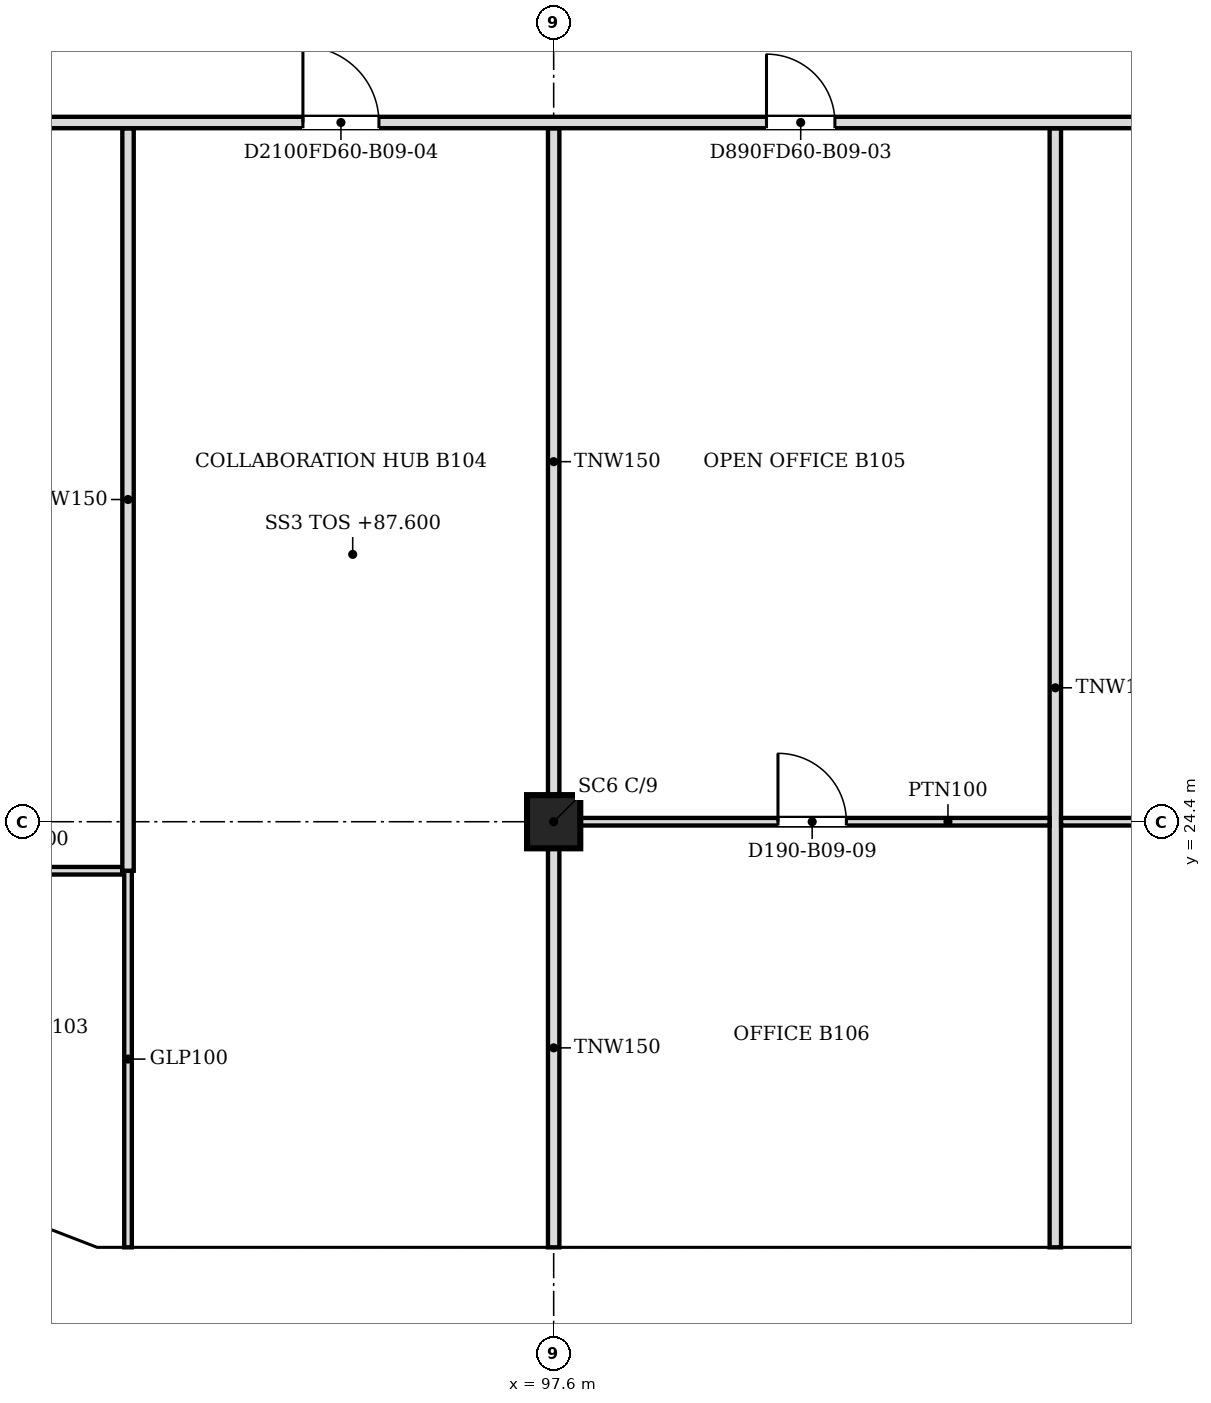
"""IFC4 building model, lengths in metres.
Left out: names, types, materials, properties, quantities, classifications, styles, units other than length and angle.
Written with IfcOpenShell. Run it as: python <this file> out.ifc"""

import sys

from ifc_helpers import new_model, si_unit, direction, frame, frame_2d, origin, origin_2d, place, context, subcontext, project, spatial, polyline, rectangle, outline, extrude, faceted_brep, source, transform, mapped, element, fill, save


model = new_model("IFC4")
c1 = context("Model", 3, precision=1e-05, world=origin(), true_north=direction((0.0, 1.0)))
c2 = subcontext(c1, "Body", "Model", "MODEL_VIEW")
j1 = project(units=[si_unit("LENGTHUNIT", "METRE"), si_unit("PLANEANGLEUNIT", "RADIAN")], contexts=[c1])
p1 = place(None, origin())
s1 = spatial("IfcSite", under=j1, at=p1, CompositionType="ELEMENT")
p2 = place(p1, origin())
s2 = spatial("IfcBuilding", under=s1, at=p2, CompositionType="ELEMENT")
p3 = place(p2, frame((0.0, 0.0, 87.6)))
s3 = spatial("IfcBuildingStorey", under=s2, at=p3, CompositionType="ELEMENT", Elevation=87.6)
p4 = place(p3, frame((97.6, 24.4, 0.0), z_axis=(0.0, 0.0, 1.0), x_axis=(1.0, 0.0, 0.0)))
e1 = element("IfcColumn", 1, at=p4, inside=s3, PredefinedType="COLUMN", context=c2, shape_type="SweptSolid", body=[
    extrude(rectangle(XDim=0.7, YDim=0.7, at=origin_2d()), origin(), (0.0, 0.0, 1.0), 3.6),
])
m1 = source(origin(), c2, "Body", "Brep", [
    faceted_brep([(3.003, -0.25, 0.0), (6.053, -0.25, 3.8), (3.003, -0.25, 7.6), (0.0, -0.25, 3.8), (0.047, 0.25, 3.859), (3.003, 0.25, 7.6), (6.053, 0.25, 3.8), (3.003, 0.25, 0.0), (0.047, 0.25, 3.741), (0.0, 0.0, 3.8)], [[[0, 1, 2, 3]], [[4, 5, 6, 7, 8]], [[7, 6, 1, 0]], [[6, 5, 2, 1]], [[5, 4, 9, 3, 2]], [[8, 7, 0, 3, 9]], [[8, 9, 4]]]),
])
p5 = place(p3, frame((91.547, 18.55, -3.8), z_axis=(0.0, 0.0, 1.0), x_axis=(1.0, 0.0, 0.0)))
e2 = element("IfcWall", 2, at=p5, inside=s3, PredefinedType="SOLIDWALL", context=c2, shape_type="MappedRepresentation", body=[
    mapped(m1, transform((0.0, 0.0, 0.0), scale=1.0)),
])
m2 = source(origin(), c2, "Body", "SweptSolid", [
    extrude(outline(polyline([(3.005, 0.401), (5.733, 3.8), (3.005, 7.199), (0.319, 3.8), (3.005, 0.401)])), frame((0.0, 0.26, 0.0), z_axis=(0.0, -1.0, 0.0), x_axis=(1.0, 0.0, 0.0)), (0.0, 0.0, 1.0), 0.52),
])
p6 = place(p5, origin())
e3 = element("IfcOpeningElement", 3, at=p6, cuts=e2, PredefinedType="OPENING", context=c2, shape_type="MappedRepresentation", body=[
    mapped(m2, transform((0.0, 0.0, 0.0), scale=1.0)),
])
m3 = source(origin(), c2, "Body", "Brep", [
    faceted_brep([(3.05, -0.25, 0.0), (6.1, -0.25, 3.8), (6.1, -0.25, 3.8), (3.05, -0.25, 7.6), (0.0, -0.25, 3.8), (0.0, 0.25, 3.8), (3.05, 0.25, 7.6), (6.1, 0.25, 3.8), (6.1, 0.25, 3.8), (3.05, 0.25, 0.0)], [[[0, 1, 2, 3, 4]], [[5, 6, 7, 8, 9]], [[9, 8, 1, 0]], [[7, 6, 3, 2]], [[6, 5, 4, 3]], [[5, 9, 0, 4]], [[1, 8, 7, 2]]]),
])
p7 = place(p3, frame((97.6, 18.55, -3.8), z_axis=(0.0, 0.0, 1.0), x_axis=(1.0, 0.0, 0.0)))
e4 = element("IfcWall", 4, at=p7, inside=s3, PredefinedType="SOLIDWALL", context=c2, shape_type="MappedRepresentation", body=[
    mapped(m3, transform((0.0, 0.0, 0.0), scale=1.0)),
])
m4 = source(origin(), c2, "Body", "SweptSolid", [
    extrude(outline(polyline([(3.05, 0.399), (5.78, 3.8), (3.05, 7.2), (0.321, 3.8), (3.05, 0.399)])), frame((0.0, 0.26, 0.0), z_axis=(0.0, -1.0, 0.0), x_axis=(1.0, 0.0, 0.0)), (0.0, 0.0, 1.0), 0.52),
])
p8 = place(p7, origin())
e5 = element("IfcOpeningElement", 5, at=p8, cuts=e4, PredefinedType="OPENING", context=c2, shape_type="MappedRepresentation", body=[
    mapped(m4, transform((0.0, 0.0, 0.0), scale=1.0)),
])
m5 = source(origin(), c2, "Body", "SweptSolid", [
    extrude(outline(polyline([(3.05, 0.0), (6.1, 3.8), (3.05, 7.6), (0.0, 3.8), (3.05, 0.0)])), frame((0.0, 0.25, 0.0), z_axis=(0.0, -1.0, 0.0), x_axis=(1.0, 0.0, 0.0)), (0.0, 0.0, 1.0), 0.5),
])
p9 = place(p3, frame((103.7, 18.55, -3.8), z_axis=(0.0, 0.0, 1.0), x_axis=(1.0, 0.0, 0.0)))
e6 = element("IfcWall", 6, at=p9, inside=s3, PredefinedType="SOLIDWALL", context=c2, shape_type="MappedRepresentation", body=[
    mapped(m5, transform((0.0, 0.0, 0.0), scale=1.0)),
])
p10 = place(p9, origin())
e7 = element("IfcOpeningElement", 7, at=p10, cuts=e6, PredefinedType="OPENING", context=c2, shape_type="MappedRepresentation", body=[
    mapped(m4, transform((0.0, 0.0, 0.0), scale=1.0)),
])
m6 = source(origin(), c2, "Body", "Brep", [
    faceted_brep([(0.053, -0.25, 0.0), (3.003, -0.25, 3.8), (0.053, -0.25, 7.6), (0.0, -0.25, 7.531), (0.0, -0.25, 0.068), (0.106, 0.25, 7.532), (2.957, 0.25, 3.86), (2.957, 0.25, 3.74), (0.106, 0.25, 0.068), (3.003, 0.0, 3.8), (0.053, 0.0, 0.0), (0.053, 0.0, 7.6)], [[[0, 1, 2, 3, 4]], [[5, 6, 7, 8]], [[8, 7, 9, 1, 0, 10]], [[6, 5, 11, 2, 1, 9]], [[3, 2, 11]], [[10, 0, 4]], [[8, 10, 4, 3, 11, 5]], [[7, 6, 9]]]),
])
p11 = place(p3, frame((88.744, 19.631, -3.8), z_axis=(0.0, 0.0, 1.0), x_axis=(0.932997369089, -0.359883188373, 0.0)))
e8 = element("IfcWall", 8, at=p11, inside=s3, PredefinedType="SOLIDWALL", context=c2, shape_type="MappedRepresentation", body=[
    mapped(m6, transform((0.0, 0.0, 0.0), scale=1.0)),
])
m7 = source(origin(), c2, "Body", "SweptSolid", [
    extrude(outline(polyline([(0.253, 0.665), (2.687, 3.8), (0.253, 6.935), (0.253, 0.665)])), frame((0.0, 0.26, 0.0), z_axis=(0.0, -1.0, 0.0), x_axis=(1.0, 0.0, 0.0)), (0.0, 0.0, 1.0), 0.52),
])
p12 = place(p11, origin())
e9 = element("IfcOpeningElement", 9, at=p12, cuts=e8, PredefinedType="OPENING", context=c2, shape_type="MappedRepresentation", body=[
    mapped(m7, transform((0.0, 0.0, 0.0), scale=1.0)),
])
p13 = place(p2, frame((0.0, 0.0, 91.4)))
s4 = spatial("IfcBuildingStorey", under=s2, at=p13, CompositionType="ELEMENT", Elevation=91.4)
m8 = source(origin(), c2, "Body", "Brep", [
    faceted_brep([(0.047, -0.25, 0.0), (3.05, -0.25, 3.8), (0.047, -0.25, 7.6), (0.0, -0.25, 7.54), (0.0, -0.25, 0.06), (0.093, 0.25, 7.541), (3.05, 0.25, 3.8), (0.093, 0.25, 0.059), (0.047, 0.0, 0.0), (0.047, 0.0, 7.6)], [[[0, 1, 2, 3, 4]], [[5, 6, 7]], [[7, 6, 1, 0, 8]], [[6, 5, 9, 2, 1]], [[3, 2, 9]], [[8, 0, 4]], [[7, 8, 4, 3, 9, 5]]]),
])
p14 = place(p13, frame((91.5, 18.55, -3.8), z_axis=(0.0, 0.0, 1.0), x_axis=(1.0, 0.0, 0.0)))
e10 = element("IfcWall", 10, at=p14, inside=s4, PredefinedType="SOLIDWALL", context=c2, shape_type="MappedRepresentation", body=[
    mapped(m8, transform((0.0, 0.0, 0.0), scale=1.0)),
])
m9 = source(origin(), c2, "Body", "SweptSolid", [
    extrude(outline(polyline([(0.247, 0.656), (2.731, 3.8), (0.247, 6.944), (0.247, 0.656)])), frame((0.0, 0.26, 0.0), z_axis=(0.0, -1.0, 0.0), x_axis=(1.0, 0.0, 0.0)), (0.0, 0.0, 1.0), 0.52),
])
p15 = place(p14, origin())
e11 = element("IfcOpeningElement", 11, at=p15, cuts=e10, PredefinedType="OPENING", context=c2, shape_type="MappedRepresentation", body=[
    mapped(m9, transform((0.0, 0.0, 0.0), scale=1.0)),
])
m10 = source(origin(), c2, "Body", "Brep", [
    faceted_brep([(2.95, -0.25, 0.0), (2.997, -0.25, 0.059), (2.997, -0.25, 7.541), (2.95, -0.25, 7.6), (0.0, -0.25, 3.8), (0.053, 0.25, 3.868), (2.904, 0.25, 7.54), (2.904, 0.25, 0.06), (0.053, 0.25, 3.732), (2.95, 0.0, 0.0), (2.95, 0.0, 7.6), (0.0, 0.0, 3.8)], [[[0, 1, 2, 3, 4]], [[5, 6, 7, 8]], [[1, 0, 9]], [[10, 3, 2]], [[6, 5, 11, 4, 3, 10]], [[8, 7, 9, 0, 4, 11]], [[8, 11, 5]], [[1, 9, 7, 6, 10, 2]]]),
])
p16 = place(p13, frame((88.794, 19.612, -3.8), z_axis=(0.0, 0.0, 1.0), x_axis=(0.933000876937, -0.359874094142, 0.0)))
e12 = element("IfcWall", 12, at=p16, inside=s4, PredefinedType="SOLIDWALL", context=c2, shape_type="MappedRepresentation", body=[
    mapped(m10, transform((0.0, 0.0, 0.0), scale=1.0)),
])
m11 = source(origin(), c2, "Body", "SweptSolid", [
    extrude(outline(polyline([(2.75, 6.935), (0.316, 3.8), (2.75, 0.665), (2.75, 6.935)])), frame((0.0, 0.26, 0.0), z_axis=(0.0, -1.0, 0.0), x_axis=(1.0, 0.0, 0.0)), (0.0, 0.0, 1.0), 0.52),
])
p17 = place(p16, origin())
e13 = element("IfcOpeningElement", 13, at=p17, cuts=e12, PredefinedType="OPENING", context=c2, shape_type="MappedRepresentation", body=[
    mapped(m11, transform((0.0, 0.0, 0.0), scale=1.0)),
])
m12 = source(origin(), c2, "Body", "Brep", [
    faceted_brep([(3.05, -0.25, 0.0), (6.1, -0.25, 3.8), (6.1, -0.25, 3.8), (3.05, -0.25, 7.6), (0.0, -0.25, 3.8), (0.0, 0.25, 3.8), (3.05, 0.25, 7.6), (6.1, 0.25, 3.8), (6.1, 0.25, 3.8), (3.05, 0.25, 0.0)], [[[0, 1, 2, 3, 4]], [[5, 6, 7, 8, 9]], [[9, 8, 1, 0]], [[7, 6, 3, 2]], [[6, 5, 4, 3]], [[5, 9, 0, 4]], [[1, 8, 7, 2]]]),
])
p18 = place(p13, frame((94.55, 18.55, -3.8), z_axis=(0.0, 0.0, 1.0), x_axis=(1.0, 0.0, 0.0)))
e14 = element("IfcWall", 14, at=p18, inside=s4, PredefinedType="SOLIDWALL", context=c2, shape_type="MappedRepresentation", body=[
    mapped(m12, transform((0.0, 0.0, 0.0), scale=1.0)),
])
m13 = source(origin(), c2, "Body", "SweptSolid", [
    extrude(outline(polyline([(3.05, 0.399), (5.78, 3.8), (3.05, 7.2), (0.321, 3.8), (3.05, 0.399)])), frame((0.0, 0.26, 0.0), z_axis=(0.0, -1.0, 0.0), x_axis=(1.0, 0.0, 0.0)), (0.0, 0.0, 1.0), 0.52),
])
p19 = place(p18, origin())
e15 = element("IfcOpeningElement", 15, at=p19, cuts=e14, PredefinedType="OPENING", context=c2, shape_type="MappedRepresentation", body=[
    mapped(m13, transform((0.0, 0.0, 0.0), scale=1.0)),
])
m14 = source(origin(), c2, "Body", "SweptSolid", [
    extrude(outline(polyline([(3.05, 0.0), (6.1, 3.8), (3.05, 7.6), (0.0, 3.8), (3.05, 0.0)])), frame((0.0, 0.25, 0.0), z_axis=(0.0, -1.0, 0.0), x_axis=(1.0, 0.0, 0.0)), (0.0, 0.0, 1.0), 0.5),
])
p20 = place(p13, frame((100.65, 18.55, -3.8), z_axis=(0.0, 0.0, 1.0), x_axis=(1.0, 0.0, 0.0)))
e16 = element("IfcWall", 16, at=p20, inside=s4, PredefinedType="SOLIDWALL", context=c2, shape_type="MappedRepresentation", body=[
    mapped(m14, transform((0.0, 0.0, 0.0), scale=1.0)),
])
p21 = place(p20, origin())
e17 = element("IfcOpeningElement", 17, at=p21, cuts=e16, PredefinedType="OPENING", context=c2, shape_type="MappedRepresentation", body=[
    mapped(m13, transform((0.0, 0.0, 0.0), scale=1.0)),
])
p22 = place(p3, frame((92.0, 18.8, 0.0), z_axis=(0.0, 0.0, 1.0), x_axis=(0.0, 1.0, 0.0)))
e18 = element("IfcWall", 18, at=p22, inside=s3, PredefinedType="PARTITIONING", context=c2, shape_type="SweptSolid", body=[
    extrude(rectangle(XDim=4.954, YDim=0.1, at=frame_2d((2.477, 0.0))), origin(), (0.0, 0.0, 1.0), 3.067),
])
p23 = place(p3, frame((97.6, 18.8, 0.0), z_axis=(0.0, 0.0, 1.0), x_axis=(0.0, 1.0, 0.0)))
e19 = element("IfcWall", 19, at=p23, inside=s3, PredefinedType="PARTITIONING", context=c2, shape_type="SweptSolid", body=[
    extrude(rectangle(XDim=5.249, YDim=0.15, at=frame_2d((2.625, 0.0))), origin(), (0.0, 0.0, 1.0), 3.067),
])
p24 = place(p3, frame((104.2, 18.8, 0.0), z_axis=(0.0, 0.0, 1.0), x_axis=(0.0, 1.0, 0.0)))
e20 = element("IfcWall", 20, at=p24, inside=s3, PredefinedType="PARTITIONING", context=c2, shape_type="SweptSolid", body=[
    extrude(rectangle(XDim=14.724, YDim=0.15, at=frame_2d((7.362, 0.0))), origin(), (0.0, 0.0, 1.0), 3.067),
])
p25 = place(p3, frame((91.924, 23.755, 0.0), z_axis=(0.0, 0.0, 1.0), x_axis=(-1.0, 0.0, 0.0)))
e21 = element("IfcWall", 21, at=p25, inside=s3, PredefinedType="PARTITIONING", context=c2, shape_type="SweptSolid", body=[
    extrude(rectangle(XDim=5.739, YDim=0.1, at=frame_2d((2.87, 0.0))), origin(), (0.0, 0.0, 1.0), 3.067),
])
m15 = source(origin(), c2, "Body", "SweptSolid", [
    extrude(rectangle(XDim=0.9, YDim=2.1, at=frame_2d((0.45, 1.05))), frame((0.0, 0.06, 0.0), z_axis=(0.0, -1.0, 0.0), x_axis=(1.0, 0.0, 0.0)), (0.0, 0.0, 1.0), 0.12),
])
p26 = place(p25, frame((2.439, 0.0, 0.0)))
e22 = element("IfcOpeningElement", 22, at=p26, cuts=e21, PredefinedType="OPENING", context=c2, shape_type="MappedRepresentation", body=[
    mapped(m15, transform((0.0, 0.0, 0.0), scale=1.0)),
])
p27 = place(p3, frame((92.0, 23.755, 0.0), z_axis=(0.0, 0.0, 1.0), x_axis=(0.0, 1.0, 0.0)))
e23 = element("IfcWall", 23, at=p27, inside=s3, PredefinedType="PARTITIONING", context=c2, shape_type="SweptSolid", body=[
    extrude(rectangle(XDim=9.769, YDim=0.15, at=frame_2d((4.885, 0.0))), origin(), (0.0, 0.0, 1.0), 3.067),
])
p28 = place(p3, frame((104.124, 24.4, 0.0), z_axis=(0.0, 0.0, 1.0), x_axis=(-1.0, 0.0, 0.0)))
e24 = element("IfcWall", 24, at=p28, inside=s3, PredefinedType="PARTITIONING", context=c2, shape_type="SweptSolid", body=[
    extrude(rectangle(XDim=6.173, YDim=0.1, at=frame_2d((3.086, 0.0))), origin(), (0.0, 0.0, 1.0), 3.067),
])
p29 = place(p28, frame((2.673, 0.0, 0.0)))
e25 = element("IfcOpeningElement", 25, at=p29, cuts=e24, PredefinedType="OPENING", context=c2, shape_type="MappedRepresentation", body=[
    mapped(m15, transform((0.0, 0.0, 0.0), scale=1.0)),
])
p30 = place(p3, frame((109.449, 24.4, 0.0), z_axis=(0.0, 0.0, 1.0), x_axis=(-1.0, 0.0, 0.0)))
e26 = element("IfcWall", 26, at=p30, inside=s3, PredefinedType="PARTITIONING", context=c2, shape_type="SweptSolid", body=[
    extrude(rectangle(XDim=5.173, YDim=0.1, at=frame_2d((2.586, 0.0))), origin(), (0.0, 0.0, 1.0), 3.067),
])
p31 = place(p30, frame((2.173, 0.0, 0.0)))
e27 = element("IfcOpeningElement", 27, at=p31, cuts=e26, PredefinedType="OPENING", context=c2, shape_type="MappedRepresentation", body=[
    mapped(m15, transform((0.0, 0.0, 0.0), scale=1.0)),
])
p32 = place(p3, frame((97.6, 24.751, 0.0), z_axis=(0.0, 0.0, 1.0), x_axis=(0.0, 1.0, 0.0)))
e28 = element("IfcWall", 28, at=p32, inside=s3, PredefinedType="PARTITIONING", context=c2, shape_type="SweptSolid", body=[
    extrude(rectangle(XDim=8.773, YDim=0.15, at=frame_2d((4.386, 0.0))), origin(), (0.0, 0.0, 1.0), 3.067),
])
p33 = place(p3, frame((133.7, 33.6, 0.0), z_axis=(0.0, 0.0, 1.0), x_axis=(-1.0, 0.0, 0.0)))
e29 = element("IfcWall", 29, at=p33, inside=s3, PredefinedType="PARTITIONING", context=c2, shape_type="SweptSolid", body=[
    extrude(rectangle(XDim=47.8, YDim=0.15, at=frame_2d((23.9, 0.0))), origin(), (0.0, 0.0, 1.0), 3.067),
])
m16 = source(origin(), c2, "Body", "SweptSolid", [
    extrude(rectangle(XDim=0.9, YDim=2.1, at=frame_2d((0.45, 1.05))), frame((0.0, 0.085, 0.0), z_axis=(0.0, -1.0, 0.0), x_axis=(1.0, 0.0, 0.0)), (0.0, 0.0, 1.0), 0.17),
])
p34 = place(p33, frame((2.099, 0.0, 0.0)))
e30 = element("IfcOpeningElement", 30, at=p34, cuts=e29, PredefinedType="OPENING", context=c2, shape_type="MappedRepresentation", body=[
    mapped(m16, transform((0.0, 0.0, 0.0), scale=1.0)),
])
m17 = source(origin(), c2, "Body", "SweptSolid", [
    extrude(rectangle(XDim=1.0, YDim=2.1, at=frame_2d((0.5, 1.05))), frame((0.0, 0.085, 0.0), z_axis=(0.0, -1.0, 0.0), x_axis=(1.0, 0.0, 0.0)), (0.0, 0.0, 1.0), 0.17),
])
p35 = place(p33, frame((38.399, 0.0, 0.0)))
e31 = element("IfcOpeningElement", 31, at=p35, cuts=e29, PredefinedType="OPENING", context=c2, shape_type="MappedRepresentation", body=[
    mapped(m17, transform((0.0, 0.0, 0.0), scale=1.0)),
])
p36 = place(p33, frame((44.3, 0.0, 0.0)))
e32 = element("IfcOpeningElement", 32, at=p36, cuts=e29, PredefinedType="OPENING", context=c2, shape_type="MappedRepresentation", body=[
    mapped(m16, transform((0.0, 0.0, 0.0), scale=1.0)),
])
p37 = place(p33, frame((32.4, 0.0, 0.0)))
e33 = element("IfcOpeningElement", 33, at=p37, cuts=e29, PredefinedType="OPENING", context=c2, shape_type="MappedRepresentation", body=[
    mapped(m16, transform((0.0, 0.0, 0.0), scale=1.0)),
])
p38 = place(p33, frame((10.799, 0.0, 0.0)))
e34 = element("IfcOpeningElement", 34, at=p38, cuts=e29, PredefinedType="OPENING", context=c2, shape_type="MappedRepresentation", body=[
    mapped(m16, transform((0.0, 0.0, 0.0), scale=1.0)),
])
p39 = place(p33, frame((23.0, 0.0, 0.0)))
e35 = element("IfcOpeningElement", 35, at=p39, cuts=e29, PredefinedType="OPENING", context=c2, shape_type="MappedRepresentation", body=[
    mapped(m16, transform((0.0, 0.0, 0.0), scale=1.0)),
])
m18 = source(origin(), c2, "Body", "SweptSolid", [
    extrude(rectangle(XDim=1.0, YDim=2.1, at=frame_2d((0.5, 1.05))), frame((0.0, 0.025, 0.0), z_axis=(0.0, -1.0, 0.0), x_axis=(1.0, 0.0, 0.0)), (0.0, 0.0, 1.0), 0.05),
])
p40 = place(p35, origin())
e36 = element("IfcDoor", 36, at=p40, inside=s3, OperationType="SINGLE_SWING_RIGHT", PredefinedType="DOOR", context=c2, shape_type="MappedRepresentation", body=[
    mapped(m18, transform((0.0, 0.0, 0.0), scale=1.0)),
])
fill(e31, e36)
m19 = source(origin(), c2, "Body", "SweptSolid", [
    extrude(rectangle(XDim=0.9, YDim=2.1, at=frame_2d((0.45, 1.05))), frame((0.0, 0.025, 0.0), z_axis=(0.0, -1.0, 0.0), x_axis=(1.0, 0.0, 0.0)), (0.0, 0.0, 1.0), 0.05),
])
p41 = place(p29, origin())
e37 = element("IfcDoor", 37, at=p41, inside=s3, OperationType="SINGLE_SWING_RIGHT", PredefinedType="DOOR", context=c2, shape_type="MappedRepresentation", body=[
    mapped(m19, transform((0.0, 0.0, 0.0), scale=1.0)),
])
fill(e25, e37)
p42 = place(p37, origin())
e38 = element("IfcDoor", 38, at=p42, inside=s3, OperationType="SINGLE_SWING_RIGHT", PredefinedType="DOOR", context=c2, shape_type="MappedRepresentation", body=[
    mapped(m19, transform((0.0, 0.0, 0.0), scale=1.0)),
])
fill(e33, e38)
save(model, sys.argv[1])
